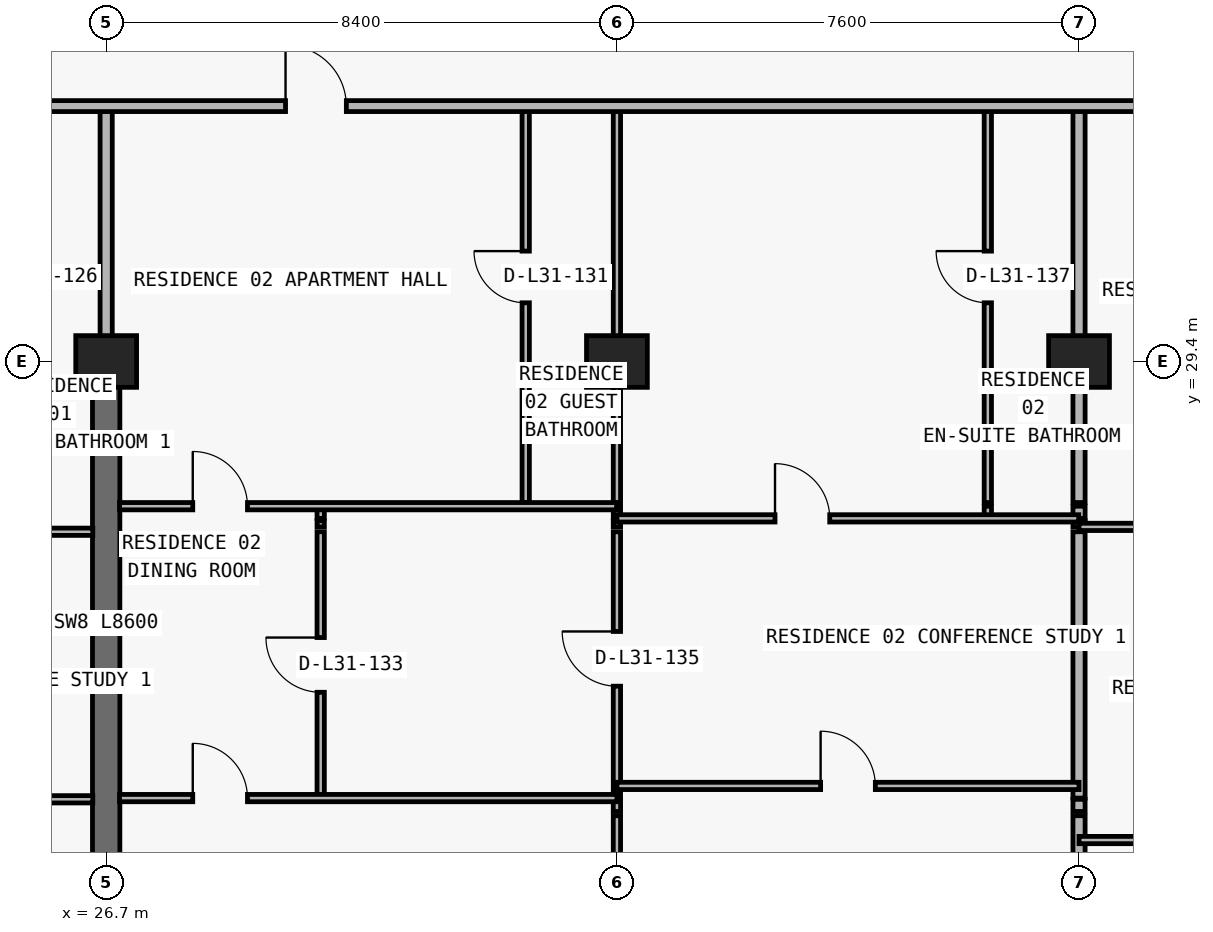
"""IFC4 building model, lengths in metres.
Left out: names, types, materials, properties, quantities, classifications, styles, units other than length and angle.
Written with IfcOpenShell. Run it as: python <this file> out.ifc"""

import sys

from ifc_helpers import new_model, si_unit, direction, frame, frame_2d, origin, origin_2d, place, context, subcontext, project, spatial, rectangle, extrude, element, fill, save


model = new_model("IFC4")
c1 = context("Model", 3, precision=1e-05, world=origin(), true_north=direction((0.0, 1.0)))
c2 = subcontext(c1, "Body", "Model", "MODEL_VIEW")
j1 = project(units=[si_unit("LENGTHUNIT", "METRE"), si_unit("PLANEANGLEUNIT", "RADIAN")], contexts=[c1])
p1 = place(None, origin())
s1 = spatial("IfcSite", under=j1, at=p1, CompositionType="ELEMENT")
p2 = place(p1, origin())
s2 = spatial("IfcBuilding", under=s1, at=p2, CompositionType="ELEMENT")
p3 = place(p2, frame((0.0, 0.0, 115.8)))
s3 = spatial("IfcBuildingStorey", under=s2, at=p3, CompositionType="ELEMENT", Elevation=115.8)
for number, where, z_axis, x_axis in (
    (1, (26.7, 29.4, 0.0), (0.0, 0.0, 1.0), (1.0, 0.0, 0.0)),
    (2, (35.1, 29.4, 0.0), (0.0, 0.0, 1.0), (1.0, 0.0, 0.0)),
    (3, (42.7, 29.4, 0.0), (0.0, 0.0, 1.0), (1.0, 0.0, 0.0)),
):
    element("IfcColumn", number, at=place(p3, frame(where, z_axis=z_axis, x_axis=x_axis)), inside=s3, PredefinedType="COLUMN", context=c2, shape_type="SweptSolid", body=[
        extrude(rectangle(XDim=1.0, YDim=0.85, at=origin_2d()), origin(), (0.0, 0.0, 1.0), 3.05),
    ])
p4 = place(p3, frame((26.7, 20.8, 0.0), z_axis=(0.0, 0.0, 1.0), x_axis=(0.0, 1.0, 0.0)))
e4 = element("IfcWall", 4, at=p4, inside=s3, PredefinedType="SHEAR", context=c2, shape_type="SweptSolid", body=[
    extrude(rectangle(XDim=8.6, YDim=0.45, at=frame_2d((4.3, 0.0))), origin(), (0.0, 0.0, 1.0), 3.05),
])
p5 = place(p3, frame((26.7, 29.405, 0.0), z_axis=(0.0, 0.0, 1.0), x_axis=(0.0, 1.0, 0.0)))
e5 = element("IfcWall", 5, at=p5, inside=s3, PredefinedType="PARTITIONING", context=c2, shape_type="SweptSolid", body=[
    extrude(rectangle(XDim=4.195, YDim=0.2, at=frame_2d((2.098, 0.0))), origin(), (0.0, 0.0, 1.0), 2.335),
])
p6 = place(p3, frame((30.228, 22.22, 0.0), z_axis=(0.0, 0.0, 1.0), x_axis=(0.0, 1.0, 0.0)))
e6 = element("IfcWall", 6, at=p6, inside=s3, PredefinedType="PARTITIONING", context=c2, shape_type="SweptSolid", body=[
    extrude(rectangle(XDim=4.38, YDim=0.12, at=frame_2d((2.19, 0.0))), origin(), (0.0, 0.0, 1.0), 3.05),
])
p7 = place(p6, frame((1.74, 0.0, 0.0)))
e7 = element("IfcOpeningElement", 7, at=p7, cuts=e6, PredefinedType="OPENING", context=c2, shape_type="SweptSolid", body=[
    extrude(rectangle(XDim=0.9, YDim=2.15, at=frame_2d((0.45, 1.075))), frame((0.0, 0.07, 0.0), z_axis=(0.0, -1.0, 0.0), x_axis=(1.0, 0.0, 0.0)), (0.0, 0.0, 1.0), 0.14),
])
p8 = place(p3, frame((30.228, 26.68, 0.0), z_axis=(0.0, 0.0, 1.0), x_axis=(0.0, 1.0, 0.0)))
e8 = element("IfcWall", 8, at=p8, inside=s3, PredefinedType="PARTITIONING", context=c2, shape_type="SweptSolid", body=[
    extrude(rectangle(XDim=0.1, YDim=0.12, at=frame_2d((0.05, 0.0))), origin(), (0.0, 0.0, 1.0), 3.05),
])
p9 = place(p3, frame((30.228, 26.82, 0.0), z_axis=(0.0, 0.0, 1.0), x_axis=(0.0, 1.0, 0.0)))
e9 = element("IfcWall", 9, at=p9, inside=s3, PredefinedType="PARTITIONING", context=c2, shape_type="SweptSolid", body=[
    extrude(rectangle(XDim=0.2, YDim=0.12, at=frame_2d((0.1, 0.0))), origin(), (0.0, 0.0, 1.0), 3.05),
])
p10 = place(p3, frame((33.6, 27.08, 0.0), z_axis=(0.0, 0.0, 1.0), x_axis=(0.0, 1.0, 0.0)))
e10 = element("IfcWall", 10, at=p10, inside=s3, PredefinedType="PARTITIONING", context=c2, shape_type="SweptSolid", body=[
    extrude(rectangle(XDim=6.52, YDim=0.12, at=frame_2d((3.26, 0.0))), origin(), (0.0, 0.0, 1.0), 3.05),
])
p11 = place(p10, frame((3.285, 0.0, 0.0)))
e11 = element("IfcOpeningElement", 11, at=p11, cuts=e10, PredefinedType="OPENING", context=c2, shape_type="SweptSolid", body=[
    extrude(rectangle(XDim=0.85, YDim=2.1, at=frame_2d((0.425, 1.05))), frame((0.0, 0.07, 0.0), z_axis=(0.0, -1.0, 0.0), x_axis=(1.0, 0.0, 0.0)), (0.0, 0.0, 1.0), 0.14),
])
p12 = place(p3, frame((35.1, 8.84, 0.0), z_axis=(0.0, 0.0, 1.0), x_axis=(0.0, 1.0, 0.0)))
e12 = element("IfcWall", 12, at=p12, inside=s3, PredefinedType="PARTITIONING", context=c2, shape_type="SweptSolid", body=[
    extrude(rectangle(XDim=13.09, YDim=0.12, at=frame_2d((6.545, 0.0))), origin(), (0.0, 0.0, 1.0), 2.174),
])
p13 = place(p3, frame((35.1, 22.0, 0.0), z_axis=(0.0, 0.0, 1.0), x_axis=(0.0, 1.0, 0.0)))
e13 = element("IfcWall", 13, at=p13, inside=s3, PredefinedType="PARTITIONING", context=c2, shape_type="SweptSolid", body=[
    extrude(rectangle(XDim=0.2, YDim=0.12, at=frame_2d((0.1, 0.0))), origin(), (0.0, 0.0, 1.0), 2.174),
])
p14 = place(p3, frame((35.1, 22.22, 0.0), z_axis=(0.0, 0.0, 1.0), x_axis=(0.0, 1.0, 0.0)))
e14 = element("IfcWall", 14, at=p14, inside=s3, PredefinedType="PARTITIONING", context=c2, shape_type="SweptSolid", body=[
    extrude(rectangle(XDim=4.38, YDim=0.12, at=frame_2d((2.19, 0.0))), origin(), (0.0, 0.0, 1.0), 2.174),
])
p15 = place(p14, frame((1.84, 0.0, 0.0)))
e15 = element("IfcOpeningElement", 15, at=p15, cuts=e14, PredefinedType="OPENING", context=c2, shape_type="SweptSolid", body=[
    extrude(rectangle(XDim=0.9, YDim=2.124, at=frame_2d((0.45, 1.062))), frame((0.0, 0.07, 0.0), z_axis=(0.0, -1.0, 0.0), x_axis=(1.0, 0.0, 0.0)), (0.0, 0.0, 1.0), 0.14),
])
p16 = place(p3, frame((35.1, 26.68, 0.0), z_axis=(0.0, 0.0, 1.0), x_axis=(0.0, 1.0, 0.0)))
e16 = element("IfcWall", 16, at=p16, inside=s3, PredefinedType="PARTITIONING", context=c2, shape_type="SweptSolid", body=[
    extrude(rectangle(XDim=0.1, YDim=0.12, at=frame_2d((0.05, 0.0))), origin(), (0.0, 0.0, 1.0), 2.174),
])
p17 = place(p3, frame((35.1, 26.82, 0.0), z_axis=(0.0, 0.0, 1.0), x_axis=(0.0, 1.0, 0.0)))
e17 = element("IfcWall", 17, at=p17, inside=s3, PredefinedType="PARTITIONING", context=c2, shape_type="SweptSolid", body=[
    extrude(rectangle(XDim=0.2, YDim=0.12, at=frame_2d((0.1, 0.0))), origin(), (0.0, 0.0, 1.0), 2.174),
])
p18 = place(p3, frame((35.1, 27.08, 0.0), z_axis=(0.0, 0.0, 1.0), x_axis=(0.0, 1.0, 0.0)))
e18 = element("IfcWall", 18, at=p18, inside=s3, PredefinedType="PARTITIONING", context=c2, shape_type="SweptSolid", body=[
    extrude(rectangle(XDim=6.52, YDim=0.12, at=frame_2d((3.26, 0.0))), origin(), (0.0, 0.0, 1.0), 2.174),
])
p19 = place(p3, frame((41.2, 26.82, 0.0), z_axis=(0.0, 0.0, 1.0), x_axis=(0.0, 1.0, 0.0)))
e19 = element("IfcWall", 19, at=p19, inside=s3, PredefinedType="PARTITIONING", context=c2, shape_type="SweptSolid", body=[
    extrude(rectangle(XDim=0.2, YDim=0.12, at=frame_2d((0.1, 0.0))), origin(), (0.0, 0.0, 1.0), 3.05),
])
p20 = place(p3, frame((41.2, 27.08, 0.0), z_axis=(0.0, 0.0, 1.0), x_axis=(0.0, 1.0, 0.0)))
e20 = element("IfcWall", 20, at=p20, inside=s3, PredefinedType="PARTITIONING", context=c2, shape_type="SweptSolid", body=[
    extrude(rectangle(XDim=6.52, YDim=0.12, at=frame_2d((3.26, 0.0))), origin(), (0.0, 0.0, 1.0), 3.05),
])
p21 = place(p20, frame((3.285, 0.0, 0.0)))
e21 = element("IfcOpeningElement", 21, at=p21, cuts=e20, PredefinedType="OPENING", context=c2, shape_type="SweptSolid", body=[
    extrude(rectangle(XDim=0.85, YDim=2.1, at=frame_2d((0.425, 1.05))), frame((0.0, 0.07, 0.0), z_axis=(0.0, -1.0, 0.0), x_axis=(1.0, 0.0, 0.0)), (0.0, 0.0, 1.0), 0.14),
])
p22 = place(p3, frame((42.7, 8.84, 0.0), z_axis=(0.0, 0.0, 1.0), x_axis=(0.0, 1.0, 0.0)))
e22 = element("IfcWall", 22, at=p22, inside=s3, PredefinedType="PARTITIONING", context=c2, shape_type="SweptSolid", body=[
    extrude(rectangle(XDim=13.09, YDim=0.2, at=frame_2d((6.545, 0.0))), origin(), (0.0, 0.0, 1.0), 2.174),
])
p23 = place(p3, frame((42.7, 22.0, 0.0), z_axis=(0.0, 0.0, 1.0), x_axis=(0.0, 1.0, 0.0)))
e23 = element("IfcWall", 23, at=p23, inside=s3, PredefinedType="PARTITIONING", context=c2, shape_type="SweptSolid", body=[
    extrude(rectangle(XDim=0.2, YDim=0.2, at=frame_2d((0.1, 0.0))), origin(), (0.0, 0.0, 1.0), 2.174),
])
p24 = place(p3, frame((42.7, 22.22, 0.0), z_axis=(0.0, 0.0, 1.0), x_axis=(0.0, 1.0, 0.0)))
e24 = element("IfcWall", 24, at=p24, inside=s3, PredefinedType="PARTITIONING", context=c2, shape_type="SweptSolid", body=[
    extrude(rectangle(XDim=4.38, YDim=0.2, at=frame_2d((2.19, 0.0))), origin(), (0.0, 0.0, 1.0), 2.174),
])
p25 = place(p3, frame((42.7, 26.68, 0.0), z_axis=(0.0, 0.0, 1.0), x_axis=(0.0, 1.0, 0.0)))
e25 = element("IfcWall", 25, at=p25, inside=s3, PredefinedType="PARTITIONING", context=c2, shape_type="SweptSolid", body=[
    extrude(rectangle(XDim=0.1, YDim=0.2, at=frame_2d((0.05, 0.0))), origin(), (0.0, 0.0, 1.0), 2.174),
])
p26 = place(p3, frame((42.7, 26.82, 0.0), z_axis=(0.0, 0.0, 1.0), x_axis=(0.0, 1.0, 0.0)))
e26 = element("IfcWall", 26, at=p26, inside=s3, PredefinedType="PARTITIONING", context=c2, shape_type="SweptSolid", body=[
    extrude(rectangle(XDim=0.2, YDim=0.2, at=frame_2d((0.1, 0.0))), origin(), (0.0, 0.0, 1.0), 2.174),
])
p27 = place(p3, frame((42.7, 27.08, 0.0), z_axis=(0.0, 0.0, 1.0), x_axis=(0.0, 1.0, 0.0)))
e27 = element("IfcWall", 27, at=p27, inside=s3, PredefinedType="PARTITIONING", context=c2, shape_type="SweptSolid", body=[
    extrude(rectangle(XDim=6.52, YDim=0.2, at=frame_2d((3.26, 0.0))), origin(), (0.0, 0.0, 1.0), 2.174),
])
p28 = place(p3, frame((42.7, 21.53, 0.0), z_axis=(0.0, 0.0, 1.0), x_axis=(1.0, 0.0, 0.0)))
e28 = element("IfcWall", 28, at=p28, inside=s3, PredefinedType="PARTITIONING", context=c2, shape_type="SweptSolid", body=[
    extrude(rectangle(XDim=8.18, YDim=0.12, at=frame_2d((4.09, 0.0))), origin(), (0.0, 0.0, 1.0), 3.05),
])
p29 = place(p28, frame((1.524, 0.0, 0.0)))
e29 = element("IfcOpeningElement", 29, at=p29, cuts=e28, PredefinedType="OPENING", context=c2, shape_type="SweptSolid", body=[
    extrude(rectangle(XDim=0.9, YDim=2.15, at=frame_2d((0.45, 1.075))), frame((0.0, 0.07, 0.0), z_axis=(0.0, -1.0, 0.0), x_axis=(1.0, 0.0, 0.0)), (0.0, 0.0, 1.0), 0.14),
])
p30 = place(p28, frame((5.783, 0.0, 0.0)))
e30 = element("IfcOpeningElement", 30, at=p30, cuts=e28, PredefinedType="OPENING", context=c2, shape_type="SweptSolid", body=[
    extrude(rectangle(XDim=0.9, YDim=2.15, at=frame_2d((0.45, 1.075))), frame((0.0, 0.07, 0.0), z_axis=(0.0, -1.0, 0.0), x_axis=(1.0, 0.0, 0.0)), (0.0, 0.0, 1.0), 0.14),
])
p31 = place(p3, frame((18.3, 22.2, 0.0), z_axis=(0.0, 0.0, 1.0), x_axis=(1.0, 0.0, 0.0)))
e31 = element("IfcWall", 31, at=p31, inside=s3, PredefinedType="PARTITIONING", context=c2, shape_type="SweptSolid", body=[
    extrude(rectangle(XDim=8.18, YDim=0.12, at=frame_2d((4.09, 0.0))), origin(), (0.0, 0.0, 1.0), 3.05),
])
p32 = place(p31, frame((3.64, 0.0, 0.0)))
e32 = element("IfcOpeningElement", 32, at=p32, cuts=e31, PredefinedType="OPENING", context=c2, shape_type="SweptSolid", body=[
    extrude(rectangle(XDim=0.9, YDim=2.15, at=frame_2d((0.45, 1.075))), frame((0.0, 0.07, 0.0), z_axis=(0.0, -1.0, 0.0), x_axis=(1.0, 0.0, 0.0)), (0.0, 0.0, 1.0), 0.14),
])
p33 = place(p3, frame((26.92, 22.22, 0.0), z_axis=(0.0, 0.0, 1.0), x_axis=(1.0, 0.0, 0.0)))
e33 = element("IfcWall", 33, at=p33, inside=s3, PredefinedType="PARTITIONING", context=c2, shape_type="SweptSolid", body=[
    extrude(rectangle(XDim=8.18, YDim=0.12, at=frame_2d((4.09, 0.0))), origin(), (0.0, 0.0, 1.0), 3.05),
])
p34 = place(p33, frame((1.204, 0.0, 0.0)))
e34 = element("IfcOpeningElement", 34, at=p34, cuts=e33, PredefinedType="OPENING", context=c2, shape_type="SweptSolid", body=[
    extrude(rectangle(XDim=0.9, YDim=2.15, at=frame_2d((0.45, 1.075))), frame((0.0, 0.07, 0.0), z_axis=(0.0, -1.0, 0.0), x_axis=(1.0, 0.0, 0.0)), (0.0, 0.0, 1.0), 0.14),
])
p35 = place(p3, frame((35.1, 22.42, 0.0), z_axis=(0.0, 0.0, 1.0), x_axis=(1.0, 0.0, 0.0)))
e35 = element("IfcWall", 35, at=p35, inside=s3, PredefinedType="PARTITIONING", context=c2, shape_type="SweptSolid", body=[
    extrude(rectangle(XDim=7.6, YDim=0.12, at=frame_2d((3.8, 0.0))), origin(), (0.0, 0.0, 1.0), 3.05),
])
p36 = place(p35, frame((3.35, 0.0, 0.0)))
e36 = element("IfcOpeningElement", 36, at=p36, cuts=e35, PredefinedType="OPENING", context=c2, shape_type="SweptSolid", body=[
    extrude(rectangle(XDim=0.9, YDim=2.15, at=frame_2d((0.45, 1.075))), frame((0.0, 0.07, 0.0), z_axis=(0.0, -1.0, 0.0), x_axis=(1.0, 0.0, 0.0)), (0.0, 0.0, 1.0), 0.14),
])
p37 = place(p3, frame((18.3, 26.6, 0.0), z_axis=(0.0, 0.0, 1.0), x_axis=(1.0, 0.0, 0.0)))
e37 = element("IfcWall", 37, at=p37, inside=s3, PredefinedType="PARTITIONING", context=c2, shape_type="SweptSolid", body=[
    extrude(rectangle(XDim=8.18, YDim=0.12, at=frame_2d((4.09, 0.0))), origin(), (0.0, 0.0, 1.0), 3.05),
])
p38 = place(p37, frame((3.0, 0.0, 0.0)))
e38 = element("IfcOpeningElement", 38, at=p38, cuts=e37, PredefinedType="OPENING", context=c2, shape_type="SweptSolid", body=[
    extrude(rectangle(XDim=0.9, YDim=2.15, at=frame_2d((0.45, 1.075))), frame((0.0, 0.07, 0.0), z_axis=(0.0, -1.0, 0.0), x_axis=(1.0, 0.0, 0.0)), (0.0, 0.0, 1.0), 0.14),
])
p39 = place(p3, frame((42.7, 26.68, 0.0), z_axis=(0.0, 0.0, 1.0), x_axis=(1.0, 0.0, 0.0)))
e39 = element("IfcWall", 39, at=p39, inside=s3, PredefinedType="PARTITIONING", context=c2, shape_type="SweptSolid", body=[
    extrude(rectangle(XDim=8.18, YDim=0.12, at=frame_2d((4.09, 0.0))), origin(), (0.0, 0.0, 1.0), 3.05),
])
p40 = place(p39, frame((1.693, 0.0, 0.0)))
e40 = element("IfcOpeningElement", 40, at=p40, cuts=e39, PredefinedType="OPENING", context=c2, shape_type="SweptSolid", body=[
    extrude(rectangle(XDim=0.9, YDim=2.15, at=frame_2d((0.45, 1.075))), frame((0.0, 0.07, 0.0), z_axis=(0.0, -1.0, 0.0), x_axis=(1.0, 0.0, 0.0)), (0.0, 0.0, 1.0), 0.14),
])
p41 = place(p3, frame((35.1, 26.82, 0.0), z_axis=(0.0, 0.0, 1.0), x_axis=(1.0, 0.0, 0.0)))
e41 = element("IfcWall", 41, at=p41, inside=s3, PredefinedType="PARTITIONING", context=c2, shape_type="SweptSolid", body=[
    extrude(rectangle(XDim=7.595, YDim=0.12, at=frame_2d((3.797, 0.0))), origin(), (0.0, 0.0, 1.0), 3.05),
])
p42 = place(p41, frame((2.6, 0.0, 0.0)))
e42 = element("IfcOpeningElement", 42, at=p42, cuts=e41, PredefinedType="OPENING", context=c2, shape_type="SweptSolid", body=[
    extrude(rectangle(XDim=0.9, YDim=2.15, at=frame_2d((0.45, 1.075))), frame((0.0, 0.07, 0.0), z_axis=(0.0, -1.0, 0.0), x_axis=(1.0, 0.0, 0.0)), (0.0, 0.0, 1.0), 0.14),
])
p43 = place(p3, frame((26.92, 27.02, 0.0), z_axis=(0.0, 0.0, 1.0), x_axis=(1.0, 0.0, 0.0)))
e43 = element("IfcWall", 43, at=p43, inside=s3, PredefinedType="PARTITIONING", context=c2, shape_type="SweptSolid", body=[
    extrude(rectangle(XDim=8.175, YDim=0.12, at=frame_2d((4.087, 0.0))), origin(), (0.0, 0.0, 1.0), 3.05),
])
p44 = place(p43, frame((1.204, 0.0, 0.0)))
e44 = element("IfcOpeningElement", 44, at=p44, cuts=e43, PredefinedType="OPENING", context=c2, shape_type="SweptSolid", body=[
    extrude(rectangle(XDim=0.9, YDim=2.15, at=frame_2d((0.45, 1.075))), frame((0.0, 0.07, 0.0), z_axis=(0.0, -1.0, 0.0), x_axis=(1.0, 0.0, 0.0)), (0.0, 0.0, 1.0), 0.14),
])
p45 = place(p3, frame((18.3, 33.6, 0.0), z_axis=(0.0, 0.0, 1.0), x_axis=(1.0, 0.0, 0.0)))
e45 = element("IfcWall", 45, at=p45, inside=s3, PredefinedType="PARTITIONING", context=c2, shape_type="SweptSolid", body=[
    extrude(rectangle(XDim=41.2, YDim=0.18, at=frame_2d((20.6, 0.0))), origin(), (0.0, 0.0, 1.0), 3.05),
])
p46 = place(p45, frame((11.35, 0.0, 0.0)))
e46 = element("IfcOpeningElement", 46, at=p46, cuts=e45, PredefinedType="OPENING", context=c2, shape_type="SweptSolid", body=[
    extrude(rectangle(XDim=1.0, YDim=2.2, at=frame_2d((0.5, 1.1))), frame((0.0, 0.1, 0.0), z_axis=(0.0, -1.0, 0.0), x_axis=(1.0, 0.0, 0.0)), (0.0, 0.0, 1.0), 0.2),
])
p47 = place(p45, frame((27.275, 0.0, 0.0)))
e47 = element("IfcOpeningElement", 47, at=p47, cuts=e45, PredefinedType="OPENING", context=c2, shape_type="SweptSolid", body=[
    extrude(rectangle(XDim=1.0, YDim=2.2, at=frame_2d((0.5, 1.1))), frame((0.0, 0.1, 0.0), z_axis=(0.0, -1.0, 0.0), x_axis=(1.0, 0.0, 0.0)), (0.0, 0.0, 1.0), 0.2),
])
p48 = place(p45, frame((35.675, 0.0, 0.0)))
e48 = element("IfcOpeningElement", 48, at=p48, cuts=e45, PredefinedType="OPENING", context=c2, shape_type="SweptSolid", body=[
    extrude(rectangle(XDim=1.0, YDim=2.2, at=frame_2d((0.5, 1.1))), frame((0.0, 0.1, 0.0), z_axis=(0.0, -1.0, 0.0), x_axis=(1.0, 0.0, 0.0)), (0.0, 0.0, 1.0), 0.2),
])
p49 = place(p46, origin())
e49 = element("IfcDoor", 49, at=p49, inside=s3, OperationType="SINGLE_SWING_LEFT", PredefinedType="DOOR", context=c2, shape_type="SweptSolid", body=[
    extrude(rectangle(XDim=1.0, YDim=2.2, at=frame_2d((0.5, 1.1))), frame((0.0, 0.025, 0.0), z_axis=(0.0, -1.0, 0.0), x_axis=(1.0, 0.0, 0.0)), (0.0, 0.0, 1.0), 0.05),
])
fill(e46, e49)
p50 = place(p11, origin())
e50 = element("IfcDoor", 50, at=p50, inside=s3, OperationType="SINGLE_SWING_RIGHT", PredefinedType="DOOR", context=c2, shape_type="SweptSolid", body=[
    extrude(rectangle(XDim=0.85, YDim=2.1, at=frame_2d((0.425, 1.05))), frame((0.0, 0.025, 0.0), z_axis=(0.0, -1.0, 0.0), x_axis=(1.0, 0.0, 0.0)), (0.0, 0.0, 1.0), 0.05),
])
fill(e11, e50)
p51 = place(p44, origin())
e51 = element("IfcDoor", 51, at=p51, inside=s3, OperationType="SINGLE_SWING_LEFT", PredefinedType="DOOR", context=c2, shape_type="SweptSolid", body=[
    extrude(rectangle(XDim=0.9, YDim=2.15, at=frame_2d((0.45, 1.075))), frame((0.0, 0.025, 0.0), z_axis=(0.0, -1.0, 0.0), x_axis=(1.0, 0.0, 0.0)), (0.0, 0.0, 1.0), 0.05),
])
fill(e44, e51)
p52 = place(p7, origin())
e52 = element("IfcDoor", 52, at=p52, inside=s3, OperationType="SINGLE_SWING_RIGHT", PredefinedType="DOOR", context=c2, shape_type="SweptSolid", body=[
    extrude(rectangle(XDim=0.9, YDim=2.15, at=frame_2d((0.45, 1.075))), frame((0.0, 0.025, 0.0), z_axis=(0.0, -1.0, 0.0), x_axis=(1.0, 0.0, 0.0)), (0.0, 0.0, 1.0), 0.05),
])
fill(e7, e52)
p53 = place(p34, origin())
e53 = element("IfcDoor", 53, at=p53, inside=s3, OperationType="SINGLE_SWING_LEFT", PredefinedType="DOOR", context=c2, shape_type="SweptSolid", body=[
    extrude(rectangle(XDim=0.9, YDim=2.15, at=frame_2d((0.45, 1.075))), frame((0.0, 0.025, 0.0), z_axis=(0.0, -1.0, 0.0), x_axis=(1.0, 0.0, 0.0)), (0.0, 0.0, 1.0), 0.05),
])
fill(e34, e53)
p54 = place(p15, origin())
e54 = element("IfcDoor", 54, at=p54, inside=s3, OperationType="SINGLE_SWING_RIGHT", PredefinedType="DOOR", context=c2, shape_type="SweptSolid", body=[
    extrude(rectangle(XDim=0.9, YDim=2.124, at=frame_2d((0.45, 1.062))), frame((0.0, 0.025, 0.0), z_axis=(0.0, -1.0, 0.0), x_axis=(1.0, 0.0, 0.0)), (0.0, 0.0, 1.0), 0.05),
])
fill(e15, e54)
p55 = place(p42, origin())
e55 = element("IfcDoor", 55, at=p55, inside=s3, OperationType="SINGLE_SWING_LEFT", PredefinedType="DOOR", context=c2, shape_type="SweptSolid", body=[
    extrude(rectangle(XDim=0.9, YDim=2.15, at=frame_2d((0.45, 1.075))), frame((0.0, 0.025, 0.0), z_axis=(0.0, -1.0, 0.0), x_axis=(1.0, 0.0, 0.0)), (0.0, 0.0, 1.0), 0.05),
])
fill(e42, e55)
p56 = place(p21, origin())
e56 = element("IfcDoor", 56, at=p56, inside=s3, OperationType="SINGLE_SWING_RIGHT", PredefinedType="DOOR", context=c2, shape_type="SweptSolid", body=[
    extrude(rectangle(XDim=0.85, YDim=2.1, at=frame_2d((0.425, 1.05))), frame((0.0, 0.025, 0.0), z_axis=(0.0, -1.0, 0.0), x_axis=(1.0, 0.0, 0.0)), (0.0, 0.0, 1.0), 0.05),
])
fill(e21, e56)
p57 = place(p36, origin())
e57 = element("IfcDoor", 57, at=p57, inside=s3, OperationType="SINGLE_SWING_LEFT", PredefinedType="DOOR", context=c2, shape_type="SweptSolid", body=[
    extrude(rectangle(XDim=0.9, YDim=2.15, at=frame_2d((0.45, 1.075))), frame((0.0, 0.025, 0.0), z_axis=(0.0, -1.0, 0.0), x_axis=(1.0, 0.0, 0.0)), (0.0, 0.0, 1.0), 0.05),
])
fill(e36, e57)
save(model, sys.argv[1])
